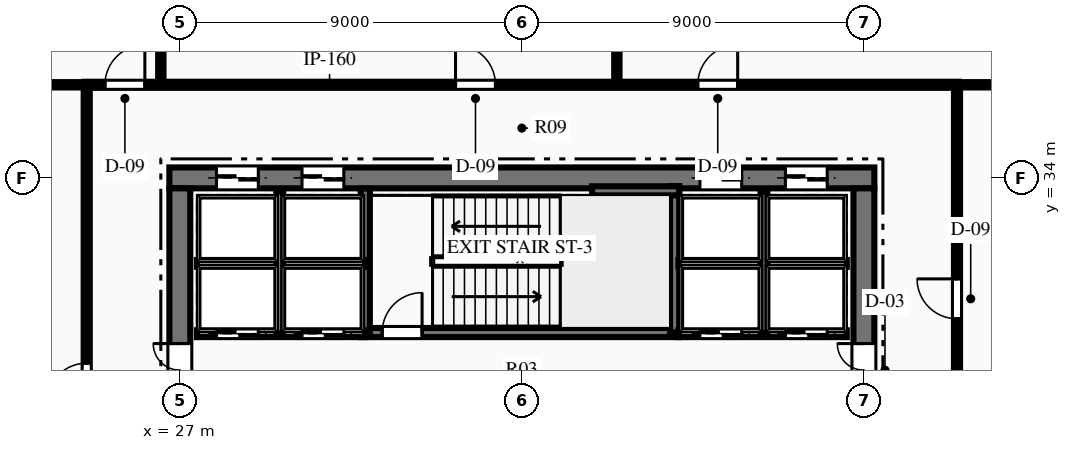
"""IFC4 building model, lengths in metres.
Left out: names, types, materials, properties, quantities, classifications, styles, units other than length and angle.
Written with IfcOpenShell. Run it as: python <this file> out.ifc"""

import sys

from ifc_helpers import new_model, si_unit, direction, frame, frame_2d, origin, place, context, subcontext, project, spatial, rectangle, extrude, element, fill, save


model = new_model("IFC4")
c1 = context("Model", 3, precision=1e-05, world=origin(), true_north=direction((0.0, 1.0)))
c2 = subcontext(c1, "Body", "Model", "MODEL_VIEW")
j1 = project(units=[si_unit("LENGTHUNIT", "METRE"), si_unit("PLANEANGLEUNIT", "RADIAN")], contexts=[c1])
p1 = place(None, origin())
s1 = spatial("IfcSite", under=j1, at=p1, CompositionType="ELEMENT")
p2 = place(p1, origin())
s2 = spatial("IfcBuilding", under=s1, at=p2, CompositionType="ELEMENT")
p3 = place(p2, frame((0.0, 0.0, 85.95)))
s3 = spatial("IfcBuildingStorey", under=s2, at=p3, CompositionType="ELEMENT", Elevation=85.95)
p4 = place(p3, frame((26.725, 34.0, 0.0), z_axis=(0.0, 0.0, 1.0), x_axis=(1.0, 0.0, 0.0)))
e1 = element("IfcWall", 1, at=p4, inside=s3, PredefinedType="SHEAR", context=c2, shape_type="SweptSolid", body=[
    extrude(rectangle(XDim=18.55, YDim=0.55, at=frame_2d((9.275, 0.0))), origin(), (0.0, 0.0, 1.0), 4.5),
])
p5 = place(p4, frame((1.24, 0.0, 0.0)))
e2 = element("IfcOpeningElement", 2, at=p5, cuts=e1, PredefinedType="OPENING", context=c2, shape_type="SweptSolid", body=[
    extrude(rectangle(XDim=1.1, YDim=2.15, at=frame_2d((0.55, 1.075))), frame((0.0, 0.285, 0.0), z_axis=(0.0, -1.0, 0.0), x_axis=(1.0, 0.0, 0.0)), (0.0, 0.0, 1.0), 0.57),
])
p6 = place(p4, frame((3.49, 0.0, 0.0)))
e3 = element("IfcOpeningElement", 3, at=p6, cuts=e1, PredefinedType="OPENING", context=c2, shape_type="SweptSolid", body=[
    extrude(rectangle(XDim=1.1, YDim=2.15, at=frame_2d((0.55, 1.075))), frame((0.0, 0.285, 0.0), z_axis=(0.0, -1.0, 0.0), x_axis=(1.0, 0.0, 0.0)), (0.0, 0.0, 1.0), 0.57),
])
p7 = place(p4, frame((13.96, 0.0, 0.0)))
e4 = element("IfcOpeningElement", 4, at=p7, cuts=e1, PredefinedType="OPENING", context=c2, shape_type="SweptSolid", body=[
    extrude(rectangle(XDim=1.1, YDim=2.15, at=frame_2d((0.55, 1.075))), frame((0.0, 0.285, 0.0), z_axis=(0.0, -1.0, 0.0), x_axis=(1.0, 0.0, 0.0)), (0.0, 0.0, 1.0), 0.57),
])
p8 = place(p4, frame((16.21, 0.0, 0.0)))
e5 = element("IfcOpeningElement", 5, at=p8, cuts=e1, PredefinedType="OPENING", context=c2, shape_type="SweptSolid", body=[
    extrude(rectangle(XDim=1.1, YDim=2.15, at=frame_2d((0.55, 1.075))), frame((0.0, 0.285, 0.0), z_axis=(0.0, -1.0, 0.0), x_axis=(1.0, 0.0, 0.0)), (0.0, 0.0, 1.0), 0.57),
])
p9 = place(p3, frame((27.0, 18.275, 0.0), z_axis=(0.0, 0.0, 1.0), x_axis=(0.0, 1.0, 0.0)))
e6 = element("IfcWall", 6, at=p9, inside=s3, PredefinedType="SHEAR", context=c2, shape_type="SweptSolid", body=[
    extrude(rectangle(XDim=15.45, YDim=0.55, at=frame_2d((7.725, 0.0))), origin(), (0.0, 0.0, 1.0), 4.5),
])
p10 = place(p9, frame((9.965, 0.0, 0.0)))
e7 = element("IfcOpeningElement", 7, at=p10, cuts=e6, PredefinedType="OPENING", context=c2, shape_type="SweptSolid", body=[
    extrude(rectangle(XDim=1.4, YDim=2.2, at=frame_2d((0.7, 1.1))), frame((0.0, 0.285, 0.0), z_axis=(0.0, -1.0, 0.0), x_axis=(1.0, 0.0, 0.0)), (0.0, 0.0, 1.0), 0.57),
])
p11 = place(p3, frame((45.0, 18.275, 0.0), z_axis=(0.0, 0.0, 1.0), x_axis=(0.0, 1.0, 0.0)))
e8 = element("IfcWall", 8, at=p11, inside=s3, PredefinedType="SHEAR", context=c2, shape_type="SweptSolid", body=[
    extrude(rectangle(XDim=15.45, YDim=0.55, at=frame_2d((7.725, 0.0))), origin(), (0.0, 0.0, 1.0), 4.5),
])
p12 = place(p11, frame((9.965, 0.0, 0.0)))
e9 = element("IfcOpeningElement", 9, at=p12, cuts=e8, PredefinedType="OPENING", context=c2, shape_type="SweptSolid", body=[
    extrude(rectangle(XDim=1.4, YDim=2.2, at=frame_2d((0.7, 1.1))), frame((0.0, 0.285, 0.0), z_axis=(0.0, -1.0, 0.0), x_axis=(1.0, 0.0, 0.0)), (0.0, 0.0, 1.0), 0.57),
])
p13 = place(p3, frame((31.76, 29.93, 0.0), z_axis=(0.0, 0.0, 1.0), x_axis=(1.0, 0.0, 0.0)))
e10 = element("IfcWall", 10, at=p13, inside=s3, PredefinedType="SHEAR", context=c2, shape_type="SweptSolid", body=[
    extrude(rectangle(XDim=8.38, YDim=0.24, at=frame_2d((4.19, 0.0))), origin(), (0.0, 0.0, 1.0), 4.5),
])
p14 = place(p13, frame((0.565, 0.0, 0.0)))
e11 = element("IfcOpeningElement", 11, at=p14, cuts=e10, PredefinedType="OPENING", context=c2, shape_type="SweptSolid", body=[
    extrude(rectangle(XDim=1.05, YDim=2.15, at=frame_2d((0.525, 1.075))), frame((0.0, 0.13, 0.0), z_axis=(0.0, -1.0, 0.0), x_axis=(1.0, 0.0, 0.0)), (0.0, 0.0, 1.0), 0.26),
])
p15 = place(p3, frame((31.88, 29.93, 0.0), z_axis=(0.0, 0.0, 1.0), x_axis=(0.0, 1.0, 0.0)))
e12 = element("IfcWall", 12, at=p15, inside=s3, PredefinedType="SHEAR", context=c2, shape_type="SweptSolid", body=[
    extrude(rectangle(XDim=3.79, YDim=0.24, at=frame_2d((1.895, 0.0))), origin(), (0.0, 0.0, 1.0), 4.5),
])
p16 = place(p3, frame((40.02, 29.93, 0.0), z_axis=(0.0, 0.0, 1.0), x_axis=(0.0, 1.0, 0.0)))
e13 = element("IfcWall", 13, at=p16, inside=s3, PredefinedType="SHEAR", context=c2, shape_type="SweptSolid", body=[
    extrude(rectangle(XDim=3.85, YDim=0.24, at=frame_2d((1.925, 0.0))), origin(), (0.0, 0.0, 1.0), 4.5),
])
p17 = place(p3, frame((37.85, 33.66, 0.0), z_axis=(0.0, 0.0, 1.0), x_axis=(1.0, 0.0, 0.0)))
e14 = element("IfcWall", 14, at=p17, inside=s3, PredefinedType="SHEAR", context=c2, shape_type="SweptSolid", body=[
    extrude(rectangle(XDim=2.29, YDim=0.24, at=frame_2d((1.145, 0.0))), origin(), (0.0, 0.0, 1.0), 4.5),
])
p18 = place(p3, frame((27.45, 29.9, 0.0), z_axis=(0.0, 0.0, 1.0), x_axis=(1.0, 0.0, 0.0)))
e15 = element("IfcWall", 15, at=p18, inside=s3, PredefinedType="PARTITIONING", context=c2, shape_type="SweptSolid", body=[
    extrude(rectangle(XDim=4.43, YDim=0.18, at=frame_2d((2.215, 0.0))), origin(), (0.0, 0.0, 1.0), 4.2),
])
p19 = place(p18, frame((0.515, 0.0, 0.0)))
e16 = element("IfcOpeningElement", 16, at=p19, cuts=e15, PredefinedType="OPENING", context=c2, shape_type="SweptSolid", body=[
    extrude(rectangle(XDim=1.1, YDim=2.15, at=frame_2d((0.55, 1.075))), frame((0.0, 0.1, 0.0), z_axis=(0.0, -1.0, 0.0), x_axis=(1.0, 0.0, 0.0)), (0.0, 0.0, 1.0), 0.2),
])
p20 = place(p18, frame((2.765, 0.0, 0.0)))
e17 = element("IfcOpeningElement", 17, at=p20, cuts=e15, PredefinedType="OPENING", context=c2, shape_type="SweptSolid", body=[
    extrude(rectangle(XDim=1.1, YDim=2.15, at=frame_2d((0.55, 1.075))), frame((0.0, 0.1, 0.0), z_axis=(0.0, -1.0, 0.0), x_axis=(1.0, 0.0, 0.0)), (0.0, 0.0, 1.0), 0.2),
])
p21 = place(p3, frame((27.45, 31.75, 0.0), z_axis=(0.0, 0.0, 1.0), x_axis=(1.0, 0.0, 0.0)))
e18 = element("IfcWall", 18, at=p21, inside=s3, PredefinedType="PARTITIONING", context=c2, shape_type="SweptSolid", body=[
    extrude(rectangle(XDim=4.43, YDim=0.18, at=frame_2d((2.215, 0.0))), origin(), (0.0, 0.0, 1.0), 4.2),
])
p22 = place(p3, frame((29.63, 29.9, 0.0), z_axis=(0.0, 0.0, 1.0), x_axis=(0.0, 1.0, 0.0)))
e19 = element("IfcWall", 19, at=p22, inside=s3, PredefinedType="PARTITIONING", context=c2, shape_type="SweptSolid", body=[
    extrude(rectangle(XDim=3.75, YDim=0.18, at=frame_2d((1.875, 0.0))), origin(), (0.0, 0.0, 1.0), 4.2),
])
p23 = place(p3, frame((40.12, 29.9, 0.0), z_axis=(0.0, 0.0, 1.0), x_axis=(1.0, 0.0, 0.0)))
e20 = element("IfcWall", 20, at=p23, inside=s3, PredefinedType="PARTITIONING", context=c2, shape_type="SweptSolid", body=[
    extrude(rectangle(XDim=4.43, YDim=0.18, at=frame_2d((2.215, 0.0))), origin(), (0.0, 0.0, 1.0), 4.2),
])
p24 = place(p23, frame((0.565, 0.0, 0.0)))
e21 = element("IfcOpeningElement", 21, at=p24, cuts=e20, PredefinedType="OPENING", context=c2, shape_type="SweptSolid", body=[
    extrude(rectangle(XDim=1.1, YDim=2.15, at=frame_2d((0.55, 1.075))), frame((0.0, 0.1, 0.0), z_axis=(0.0, -1.0, 0.0), x_axis=(1.0, 0.0, 0.0)), (0.0, 0.0, 1.0), 0.2),
])
p25 = place(p23, frame((2.815, 0.0, 0.0)))
e22 = element("IfcOpeningElement", 22, at=p25, cuts=e20, PredefinedType="OPENING", context=c2, shape_type="SweptSolid", body=[
    extrude(rectangle(XDim=1.1, YDim=2.15, at=frame_2d((0.55, 1.075))), frame((0.0, 0.1, 0.0), z_axis=(0.0, -1.0, 0.0), x_axis=(1.0, 0.0, 0.0)), (0.0, 0.0, 1.0), 0.2),
])
p26 = place(p3, frame((40.12, 31.75, 0.0), z_axis=(0.0, 0.0, 1.0), x_axis=(1.0, 0.0, 0.0)))
e23 = element("IfcWall", 23, at=p26, inside=s3, PredefinedType="PARTITIONING", context=c2, shape_type="SweptSolid", body=[
    extrude(rectangle(XDim=4.43, YDim=0.18, at=frame_2d((2.215, 0.0))), origin(), (0.0, 0.0, 1.0), 4.2),
])
p27 = place(p3, frame((42.37, 29.9, 0.0), z_axis=(0.0, 0.0, 1.0), x_axis=(0.0, 1.0, 0.0)))
e24 = element("IfcWall", 24, at=p27, inside=s3, PredefinedType="PARTITIONING", context=c2, shape_type="SweptSolid", body=[
    extrude(rectangle(XDim=3.75, YDim=0.18, at=frame_2d((1.875, 0.0))), origin(), (0.0, 0.0, 1.0), 4.2),
])
p28 = place(p3, frame((24.5, 36.45, 0.0), z_axis=(0.0, 0.0, 1.0), x_axis=(1.0, 0.0, 0.0)))
e25 = element("IfcWall", 25, at=p28, inside=s3, PredefinedType="PARTITIONING", context=c2, shape_type="SweptSolid", body=[
    extrude(rectangle(XDim=23.0, YDim=0.16, at=frame_2d((11.5, 0.0))), origin(), (0.0, 0.0, 1.0), 4.2),
])
p29 = place(p28, frame((0.53, 0.0, 0.0)))
e26 = element("IfcOpeningElement", 26, at=p29, cuts=e25, PredefinedType="OPENING", context=c2, shape_type="SweptSolid", body=[
    extrude(rectangle(XDim=1.05, YDim=2.15, at=frame_2d((0.525, 1.075))), frame((0.0, 0.09, 0.0), z_axis=(0.0, -1.0, 0.0), x_axis=(1.0, 0.0, 0.0)), (0.0, 0.0, 1.0), 0.18),
])
p30 = place(p28, frame((9.755, 0.0, 0.0)))
e27 = element("IfcOpeningElement", 27, at=p30, cuts=e25, PredefinedType="OPENING", context=c2, shape_type="SweptSolid", body=[
    extrude(rectangle(XDim=1.05, YDim=2.15, at=frame_2d((0.525, 1.075))), frame((0.0, 0.09, 0.0), z_axis=(0.0, -1.0, 0.0), x_axis=(1.0, 0.0, 0.0)), (0.0, 0.0, 1.0), 0.18),
])
p31 = place(p28, frame((16.129, 0.0, 0.0)))
e28 = element("IfcOpeningElement", 28, at=p31, cuts=e25, PredefinedType="OPENING", context=c2, shape_type="SweptSolid", body=[
    extrude(rectangle(XDim=1.05, YDim=2.15, at=frame_2d((0.525, 1.075))), frame((0.0, 0.09, 0.0), z_axis=(0.0, -1.0, 0.0), x_axis=(1.0, 0.0, 0.0)), (0.0, 0.0, 1.0), 0.18),
])
p32 = place(p3, frame((24.55, 15.55, 0.0), z_axis=(0.0, 0.0, 1.0), x_axis=(0.0, 1.0, 0.0)))
e29 = element("IfcWall", 29, at=p32, inside=s3, PredefinedType="PARTITIONING", context=c2, shape_type="SweptSolid", body=[
    extrude(rectangle(XDim=20.9, YDim=0.16, at=frame_2d((10.45, 0.0))), origin(), (0.0, 0.0, 1.0), 4.2),
])
p33 = place(p32, frame((5.075, 0.0, 0.0)))
e30 = element("IfcOpeningElement", 30, at=p33, cuts=e29, PredefinedType="OPENING", context=c2, shape_type="SweptSolid", body=[
    extrude(rectangle(XDim=0.95, YDim=2.15, at=frame_2d((0.475, 1.075))), frame((0.0, 0.09, 0.0), z_axis=(0.0, -1.0, 0.0), x_axis=(1.0, 0.0, 0.0)), (0.0, 0.0, 1.0), 0.18),
])
p34 = place(p32, frame((12.524, 0.0, 0.0)))
e31 = element("IfcOpeningElement", 31, at=p34, cuts=e29, PredefinedType="OPENING", context=c2, shape_type="SweptSolid", body=[
    extrude(rectangle(XDim=1.05, YDim=2.15, at=frame_2d((0.525, 1.075))), frame((0.0, 0.09, 0.0), z_axis=(0.0, -1.0, 0.0), x_axis=(1.0, 0.0, 0.0)), (0.0, 0.0, 1.0), 0.18),
])
p35 = place(p3, frame((47.45, 15.55, 0.0), z_axis=(0.0, 0.0, 1.0), x_axis=(0.0, 1.0, 0.0)))
e32 = element("IfcWall", 32, at=p35, inside=s3, PredefinedType="PARTITIONING", context=c2, shape_type="SweptSolid", body=[
    extrude(rectangle(XDim=20.9, YDim=0.16, at=frame_2d((10.45, 0.0))), origin(), (0.0, 0.0, 1.0), 4.2),
])
p36 = place(p35, frame((4.087, 0.0, 0.0)))
e33 = element("IfcOpeningElement", 33, at=p36, cuts=e32, PredefinedType="OPENING", context=c2, shape_type="SweptSolid", body=[
    extrude(rectangle(XDim=1.05, YDim=2.15, at=frame_2d((0.525, 1.075))), frame((0.0, 0.09, 0.0), z_axis=(0.0, -1.0, 0.0), x_axis=(1.0, 0.0, 0.0)), (0.0, 0.0, 1.0), 0.18),
])
p37 = place(p35, frame((7.885, 0.0, 0.0)))
e34 = element("IfcOpeningElement", 34, at=p37, cuts=e32, PredefinedType="OPENING", context=c2, shape_type="SweptSolid", body=[
    extrude(rectangle(XDim=1.05, YDim=2.15, at=frame_2d((0.525, 1.075))), frame((0.0, 0.09, 0.0), z_axis=(0.0, -1.0, 0.0), x_axis=(1.0, 0.0, 0.0)), (0.0, 0.0, 1.0), 0.18),
])
p38 = place(p35, frame((14.743, 0.0, 0.0)))
e35 = element("IfcOpeningElement", 35, at=p38, cuts=e32, PredefinedType="OPENING", context=c2, shape_type="SweptSolid", body=[
    extrude(rectangle(XDim=1.05, YDim=2.15, at=frame_2d((0.525, 1.075))), frame((0.0, 0.09, 0.0), z_axis=(0.0, -1.0, 0.0), x_axis=(1.0, 0.0, 0.0)), (0.0, 0.0, 1.0), 0.18),
])
p39 = place(p3, frame((5.468, 36.45, 0.0), z_axis=(0.0, 0.0, 1.0), x_axis=(1.0, 0.0, 0.0)))
e36 = element("IfcWall", 36, at=p39, inside=s3, PredefinedType="PARTITIONING", context=c2, shape_type="SweptSolid", body=[
    extrude(rectangle(XDim=19.082, YDim=0.14, at=frame_2d((9.541, 0.0))), origin(), (0.0, 0.0, 1.0), 4.2),
])
p40 = place(p3, frame((47.45, 36.45, 0.0), z_axis=(0.0, 0.0, 1.0), x_axis=(1.0, 0.0, 0.0)))
e37 = element("IfcWall", 37, at=p40, inside=s3, PredefinedType="PARTITIONING", context=c2, shape_type="SweptSolid", body=[
    extrude(rectangle(XDim=12.593, YDim=0.14, at=frame_2d((6.296, 0.0))), origin(), (0.0, 0.0, 1.0), 4.2),
])
p41 = place(p3, frame((26.5, 36.45, 0.0), z_axis=(0.0, 0.0, 1.0), x_axis=(0.0, 1.0, 0.0)))
e38 = element("IfcWall", 38, at=p41, inside=s3, PredefinedType="PARTITIONING", context=c2, shape_type="SweptSolid", body=[
    extrude(rectangle(XDim=12.631, YDim=0.14, at=frame_2d((6.315, 0.0))), origin(), (0.0, 0.0, 1.0), 4.2),
])
p42 = place(p3, frame((38.5, 36.45, 0.0), z_axis=(0.0, 0.0, 1.0), x_axis=(0.0, 1.0, 0.0)))
e39 = element("IfcWall", 39, at=p42, inside=s3, PredefinedType="PARTITIONING", context=c2, shape_type="SweptSolid", body=[
    extrude(rectangle(XDim=16.357, YDim=0.14, at=frame_2d((8.179, 0.0))), origin(), (0.0, 0.0, 1.0), 4.2),
])
p43 = place(p14, origin())
e40 = element("IfcDoor", 40, at=p43, inside=s3, OperationType="SINGLE_SWING_RIGHT", PredefinedType="DOOR", context=c2, shape_type="SweptSolid", body=[
    extrude(rectangle(XDim=1.05, YDim=2.15, at=frame_2d((0.525, 1.075))), frame((0.0, 0.025, 0.0), z_axis=(0.0, -1.0, 0.0), x_axis=(1.0, 0.0, 0.0)), (0.0, 0.0, 1.0), 0.05),
])
fill(e11, e40)
p44 = place(p10, origin())
e41 = element("IfcDoor", 41, at=p44, inside=s3, OperationType="DOUBLE_DOOR_SINGLE_SWING", PredefinedType="DOOR", context=c2, shape_type="SweptSolid", body=[
    extrude(rectangle(XDim=1.4, YDim=2.2, at=frame_2d((0.7, 1.1))), frame((0.0, 0.025, 0.0), z_axis=(0.0, -1.0, 0.0), x_axis=(1.0, 0.0, 0.0)), (0.0, 0.0, 1.0), 0.05),
])
fill(e7, e41)
p45 = place(p12, origin())
e42 = element("IfcDoor", 42, at=p45, inside=s3, OperationType="DOUBLE_DOOR_SINGLE_SWING", PredefinedType="DOOR", context=c2, shape_type="SweptSolid", body=[
    extrude(rectangle(XDim=1.4, YDim=2.2, at=frame_2d((0.7, 1.1))), frame((0.0, 0.025, 0.0), z_axis=(0.0, -1.0, 0.0), x_axis=(1.0, 0.0, 0.0)), (0.0, 0.0, 1.0), 0.05),
])
fill(e9, e42)
p46 = place(p29, origin())
e43 = element("IfcDoor", 43, at=p46, inside=s3, OperationType="SINGLE_SWING_RIGHT", PredefinedType="DOOR", context=c2, shape_type="SweptSolid", body=[
    extrude(rectangle(XDim=1.05, YDim=2.15, at=frame_2d((0.525, 1.075))), frame((0.0, 0.025, 0.0), z_axis=(0.0, -1.0, 0.0), x_axis=(1.0, 0.0, 0.0)), (0.0, 0.0, 1.0), 0.05),
])
fill(e26, e43)
p47 = place(p30, origin())
e44 = element("IfcDoor", 44, at=p47, inside=s3, OperationType="SINGLE_SWING_LEFT", PredefinedType="DOOR", context=c2, shape_type="SweptSolid", body=[
    extrude(rectangle(XDim=1.05, YDim=2.15, at=frame_2d((0.525, 1.075))), frame((0.0, 0.025, 0.0), z_axis=(0.0, -1.0, 0.0), x_axis=(1.0, 0.0, 0.0)), (0.0, 0.0, 1.0), 0.05),
])
fill(e27, e44)
p48 = place(p31, origin())
e45 = element("IfcDoor", 45, at=p48, inside=s3, OperationType="SINGLE_SWING_RIGHT", PredefinedType="DOOR", context=c2, shape_type="SweptSolid", body=[
    extrude(rectangle(XDim=1.05, YDim=2.15, at=frame_2d((0.525, 1.075))), frame((0.0, 0.025, 0.0), z_axis=(0.0, -1.0, 0.0), x_axis=(1.0, 0.0, 0.0)), (0.0, 0.0, 1.0), 0.05),
])
fill(e28, e45)
p49 = place(p34, origin())
e46 = element("IfcDoor", 46, at=p49, inside=s3, OperationType="SINGLE_SWING_LEFT", PredefinedType="DOOR", context=c2, shape_type="SweptSolid", body=[
    extrude(rectangle(XDim=1.05, YDim=2.15, at=frame_2d((0.525, 1.075))), frame((0.0, 0.025, 0.0), z_axis=(0.0, -1.0, 0.0), x_axis=(1.0, 0.0, 0.0)), (0.0, 0.0, 1.0), 0.05),
])
fill(e31, e46)
p50 = place(p38, origin())
e47 = element("IfcDoor", 47, at=p50, inside=s3, OperationType="SINGLE_SWING_RIGHT", PredefinedType="DOOR", context=c2, shape_type="SweptSolid", body=[
    extrude(rectangle(XDim=1.05, YDim=2.15, at=frame_2d((0.525, 1.075))), frame((0.0, 0.025, 0.0), z_axis=(0.0, -1.0, 0.0), x_axis=(1.0, 0.0, 0.0)), (0.0, 0.0, 1.0), 0.05),
])
fill(e35, e47)
p51 = place(p19, origin())
e48 = element("IfcDoor", 48, at=p51, inside=s3, OperationType="SLIDING_TO_LEFT", PredefinedType="DOOR", context=c2, shape_type="SweptSolid", body=[
    extrude(rectangle(XDim=1.1, YDim=2.15, at=frame_2d((0.55, 1.075))), frame((0.0, 0.025, 0.0), z_axis=(0.0, -1.0, 0.0), x_axis=(1.0, 0.0, 0.0)), (0.0, 0.0, 1.0), 0.05),
])
fill(e16, e48)
p52 = place(p20, origin())
e49 = element("IfcDoor", 49, at=p52, inside=s3, OperationType="SLIDING_TO_LEFT", PredefinedType="DOOR", context=c2, shape_type="SweptSolid", body=[
    extrude(rectangle(XDim=1.1, YDim=2.15, at=frame_2d((0.55, 1.075))), frame((0.0, 0.025, 0.0), z_axis=(0.0, -1.0, 0.0), x_axis=(1.0, 0.0, 0.0)), (0.0, 0.0, 1.0), 0.05),
])
fill(e17, e49)
p53 = place(p5, origin())
e50 = element("IfcDoor", 50, at=p53, inside=s3, OperationType="SLIDING_TO_LEFT", PredefinedType="DOOR", context=c2, shape_type="SweptSolid", body=[
    extrude(rectangle(XDim=1.1, YDim=2.15, at=frame_2d((0.55, 1.075))), frame((0.0, 0.025, 0.0), z_axis=(0.0, -1.0, 0.0), x_axis=(1.0, 0.0, 0.0)), (0.0, 0.0, 1.0), 0.05),
])
fill(e2, e50)
p54 = place(p6, origin())
e51 = element("IfcDoor", 51, at=p54, inside=s3, OperationType="SLIDING_TO_LEFT", PredefinedType="DOOR", context=c2, shape_type="SweptSolid", body=[
    extrude(rectangle(XDim=1.1, YDim=2.15, at=frame_2d((0.55, 1.075))), frame((0.0, 0.025, 0.0), z_axis=(0.0, -1.0, 0.0), x_axis=(1.0, 0.0, 0.0)), (0.0, 0.0, 1.0), 0.05),
])
fill(e3, e51)
p55 = place(p24, origin())
e52 = element("IfcDoor", 52, at=p55, inside=s3, OperationType="SLIDING_TO_LEFT", PredefinedType="DOOR", context=c2, shape_type="SweptSolid", body=[
    extrude(rectangle(XDim=1.1, YDim=2.15, at=frame_2d((0.55, 1.075))), frame((0.0, 0.025, 0.0), z_axis=(0.0, -1.0, 0.0), x_axis=(1.0, 0.0, 0.0)), (0.0, 0.0, 1.0), 0.05),
])
fill(e21, e52)
p56 = place(p25, origin())
e53 = element("IfcDoor", 53, at=p56, inside=s3, OperationType="SLIDING_TO_LEFT", PredefinedType="DOOR", context=c2, shape_type="SweptSolid", body=[
    extrude(rectangle(XDim=1.1, YDim=2.15, at=frame_2d((0.55, 1.075))), frame((0.0, 0.025, 0.0), z_axis=(0.0, -1.0, 0.0), x_axis=(1.0, 0.0, 0.0)), (0.0, 0.0, 1.0), 0.05),
])
fill(e22, e53)
p57 = place(p7, origin())
e54 = element("IfcDoor", 54, at=p57, inside=s3, OperationType="SLIDING_TO_LEFT", PredefinedType="DOOR", context=c2, shape_type="SweptSolid", body=[
    extrude(rectangle(XDim=1.1, YDim=2.15, at=frame_2d((0.55, 1.075))), frame((0.0, 0.025, 0.0), z_axis=(0.0, -1.0, 0.0), x_axis=(1.0, 0.0, 0.0)), (0.0, 0.0, 1.0), 0.05),
])
fill(e4, e54)
p58 = place(p8, origin())
e55 = element("IfcDoor", 55, at=p58, inside=s3, OperationType="SLIDING_TO_LEFT", PredefinedType="DOOR", context=c2, shape_type="SweptSolid", body=[
    extrude(rectangle(XDim=1.1, YDim=2.15, at=frame_2d((0.55, 1.075))), frame((0.0, 0.025, 0.0), z_axis=(0.0, -1.0, 0.0), x_axis=(1.0, 0.0, 0.0)), (0.0, 0.0, 1.0), 0.05),
])
fill(e5, e55)
save(model, sys.argv[1])
